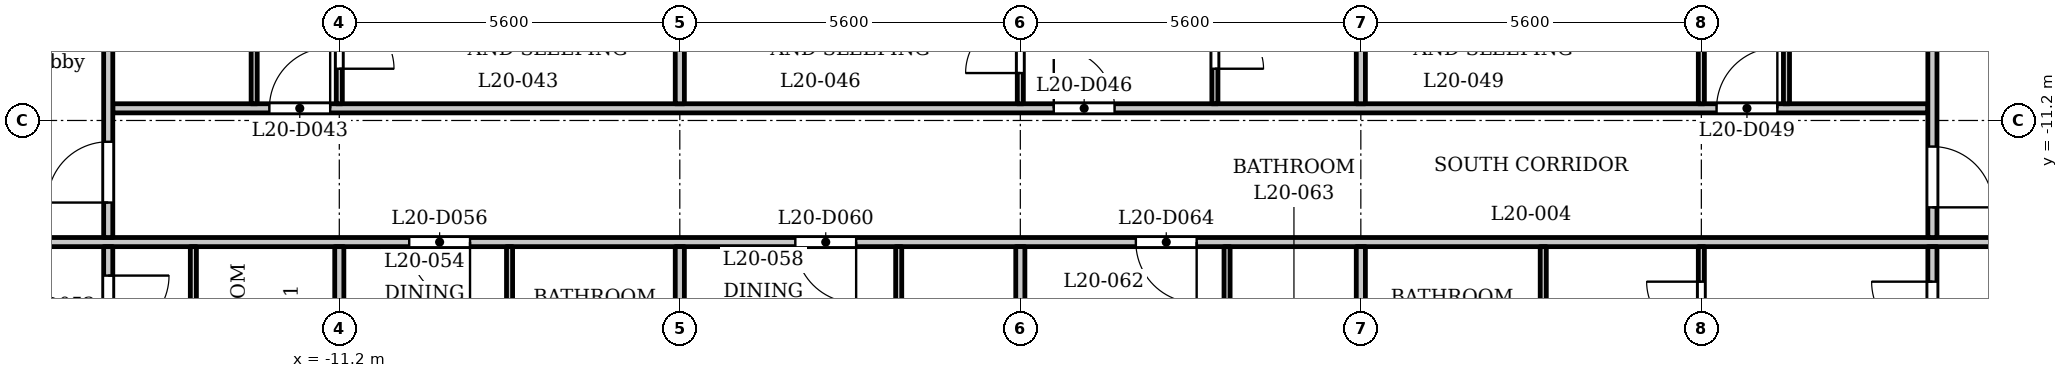
"""IFC4 building model, lengths in metres.
Left out: names, types, materials, properties, quantities, classifications, styles, units other than length and angle.
Written with IfcOpenShell. Run it as: python <this file> out.ifc"""

import sys

from ifc_helpers import new_model, si_unit, direction, frame, frame_2d, origin, place, context, subcontext, project, spatial, rectangle, extrude, element, fill, save


model = new_model("IFC4")
c1 = context("Model", 3, precision=1e-05, world=origin(), true_north=direction((0.0, 1.0)))
c2 = subcontext(c1, "Body", "Model", "MODEL_VIEW")
j1 = project(units=[si_unit("LENGTHUNIT", "METRE"), si_unit("PLANEANGLEUNIT", "RADIAN")], contexts=[c1])
p1 = place(None, origin())
s1 = spatial("IfcSite", under=j1, at=p1, CompositionType="ELEMENT")
p2 = place(p1, origin())
s2 = spatial("IfcBuilding", under=s1, at=p2, CompositionType="ELEMENT")
p3 = place(p2, frame((0.0, 0.0, 83.3)))
s3 = spatial("IfcBuildingStorey", under=s2, at=p3, CompositionType="ELEMENT", Elevation=83.3)
p4 = place(p3, frame((-17.4, -13.2, 0.0), z_axis=(0.0, 0.0, 1.0), x_axis=(1.0, 0.0, 0.0)))
e1 = element("IfcWall", 1, at=p4, inside=s3, PredefinedType="PARTITIONING", context=c2, shape_type="SweptSolid", body=[
    extrude(rectangle(XDim=34.8, YDim=0.15, at=frame_2d((17.4, 0.0))), origin(), (0.0, 0.0, 1.0), 3.2),
])
p5 = place(p4, frame((0.15, 0.0, 0.0)))
e2 = element("IfcOpeningElement", 2, at=p5, cuts=e1, PredefinedType="OPENING", context=c2, shape_type="SweptSolid", body=[
    extrude(rectangle(XDim=1.0, YDim=2.1, at=frame_2d((0.5, 1.05))), frame((0.0, 0.085, 0.0), z_axis=(0.0, -1.0, 0.0), x_axis=(1.0, 0.0, 0.0)), (0.0, 0.0, 1.0), 0.17),
])
p6 = place(p4, frame((33.55, 0.0, 0.0)))
e3 = element("IfcOpeningElement", 3, at=p6, cuts=e1, PredefinedType="OPENING", context=c2, shape_type="SweptSolid", body=[
    extrude(rectangle(XDim=1.0, YDim=2.1, at=frame_2d((0.5, 1.05))), frame((0.0, 0.085, 0.0), z_axis=(0.0, -1.0, 0.0), x_axis=(1.0, 0.0, 0.0)), (0.0, 0.0, 1.0), 0.17),
])
p7 = place(p4, frame((7.35, 0.0, 0.0)))
e4 = element("IfcOpeningElement", 4, at=p7, cuts=e1, PredefinedType="OPENING", context=c2, shape_type="SweptSolid", body=[
    extrude(rectangle(XDim=1.0, YDim=2.1, at=frame_2d((0.5, 1.05))), frame((0.0, 0.085, 0.0), z_axis=(0.0, -1.0, 0.0), x_axis=(1.0, 0.0, 0.0)), (0.0, 0.0, 1.0), 0.17),
])
p8 = place(p4, frame((13.7, 0.0, 0.0)))
e5 = element("IfcOpeningElement", 5, at=p8, cuts=e1, PredefinedType="OPENING", context=c2, shape_type="SweptSolid", body=[
    extrude(rectangle(XDim=1.0, YDim=2.1, at=frame_2d((0.5, 1.05))), frame((0.0, 0.085, 0.0), z_axis=(0.0, -1.0, 0.0), x_axis=(1.0, 0.0, 0.0)), (0.0, 0.0, 1.0), 0.17),
])
p9 = place(p4, frame((19.3, 0.0, 0.0)))
e6 = element("IfcOpeningElement", 6, at=p9, cuts=e1, PredefinedType="OPENING", context=c2, shape_type="SweptSolid", body=[
    extrude(rectangle(XDim=1.0, YDim=2.1, at=frame_2d((0.5, 1.05))), frame((0.0, 0.085, 0.0), z_axis=(0.0, -1.0, 0.0), x_axis=(1.0, 0.0, 0.0)), (0.0, 0.0, 1.0), 0.17),
])
p10 = place(p3, frame((-14.925, -11.0, 0.0), z_axis=(0.0, 0.0, 1.0), x_axis=(1.0, 0.0, 0.0)))
e7 = element("IfcWall", 7, at=p10, inside=s3, PredefinedType="PARTITIONING", context=c2, shape_type="SweptSolid", body=[
    extrude(rectangle(XDim=29.85, YDim=0.15, at=frame_2d((14.925, 0.0))), origin(), (0.0, 0.0, 1.0), 3.2),
])
p11 = place(p10, frame((2.575, 0.0, 0.0)))
e8 = element("IfcOpeningElement", 8, at=p11, cuts=e7, PredefinedType="OPENING", context=c2, shape_type="SweptSolid", body=[
    extrude(rectangle(XDim=1.0, YDim=2.1, at=frame_2d((0.5, 1.05))), frame((0.0, 0.085, 0.0), z_axis=(0.0, -1.0, 0.0), x_axis=(1.0, 0.0, 0.0)), (0.0, 0.0, 1.0), 0.17),
])
p12 = place(p10, frame((15.475, 0.0, 0.0)))
e9 = element("IfcOpeningElement", 9, at=p12, cuts=e7, PredefinedType="OPENING", context=c2, shape_type="SweptSolid", body=[
    extrude(rectangle(XDim=1.0, YDim=2.1, at=frame_2d((0.5, 1.05))), frame((0.0, 0.085, 0.0), z_axis=(0.0, -1.0, 0.0), x_axis=(1.0, 0.0, 0.0)), (0.0, 0.0, 1.0), 0.17),
])
p13 = place(p10, frame((26.375, 0.0, 0.0)))
e10 = element("IfcOpeningElement", 10, at=p13, cuts=e7, PredefinedType="OPENING", context=c2, shape_type="SweptSolid", body=[
    extrude(rectangle(XDim=1.0, YDim=2.1, at=frame_2d((0.5, 1.05))), frame((0.0, 0.085, 0.0), z_axis=(0.0, -1.0, 0.0), x_axis=(1.0, 0.0, 0.0)), (0.0, 0.0, 1.0), 0.17),
])
p14 = place(p3, frame((-15.0, -15.325, 0.0), z_axis=(0.0, 0.0, 1.0), x_axis=(0.0, 1.0, 0.0)))
e11 = element("IfcWall", 11, at=p14, inside=s3, PredefinedType="PARTITIONING", context=c2, shape_type="SweptSolid", body=[
    extrude(rectangle(XDim=2.05, YDim=0.15, at=frame_2d((1.025, 0.0))), origin(), (0.0, 0.0, 1.0), 3.2),
])
p15 = place(p14, frame((0.574, 0.0, 0.0)))
e12 = element("IfcOpeningElement", 12, at=p15, cuts=e11, PredefinedType="OPENING", context=c2, shape_type="SweptSolid", body=[
    extrude(rectangle(XDim=1.0, YDim=2.1, at=frame_2d((0.5, 1.05))), frame((0.0, 0.085, 0.0), z_axis=(0.0, -1.0, 0.0), x_axis=(1.0, 0.0, 0.0)), (0.0, 0.0, 1.0), 0.17),
])
p16 = place(p3, frame((-15.0, -13.125, 0.0), z_axis=(0.0, 0.0, 1.0), x_axis=(0.0, 1.0, 0.0)))
e13 = element("IfcWall", 13, at=p16, inside=s3, PredefinedType="PARTITIONING", context=c2, shape_type="SweptSolid", body=[
    extrude(rectangle(XDim=6.356, YDim=0.15, at=frame_2d((3.178, 0.0))), origin(), (0.0, 0.0, 1.0), 3.2),
])
p17 = place(p16, frame((0.575, 0.0, 0.0)))
e14 = element("IfcOpeningElement", 14, at=p17, cuts=e13, PredefinedType="OPENING", context=c2, shape_type="SweptSolid", body=[
    extrude(rectangle(XDim=1.0, YDim=2.1, at=frame_2d((0.5, 1.05))), frame((0.0, 0.085, 0.0), z_axis=(0.0, -1.0, 0.0), x_axis=(1.0, 0.0, 0.0)), (0.0, 0.0, 1.0), 0.17),
])
p18 = place(p3, frame((-13.6, -16.45, 0.0), z_axis=(0.0, 0.0, 1.0), x_axis=(0.0, 1.0, 0.0)))
e15 = element("IfcWall", 15, at=p18, inside=s3, PredefinedType="PARTITIONING", context=c2, shape_type="SweptSolid", body=[
    extrude(rectangle(XDim=3.175, YDim=0.1, at=frame_2d((1.587, 0.0))), origin(), (0.0, 0.0, 1.0), 3.2),
])
p19 = place(p3, frame((-12.6, -10.925, 0.0), z_axis=(0.0, 0.0, 1.0), x_axis=(0.0, 1.0, 0.0)))
e16 = element("IfcWall", 16, at=p19, inside=s3, PredefinedType="PARTITIONING", context=c2, shape_type="SweptSolid", body=[
    extrude(rectangle(XDim=3.605, YDim=0.1, at=frame_2d((1.802, 0.0))), origin(), (0.0, 0.0, 1.0), 3.2),
])
p20 = place(p19, frame((1.105, 0.0, 0.0)))
e17 = element("IfcOpeningElement", 17, at=p20, cuts=e16, PredefinedType="OPENING", context=c2, shape_type="SweptSolid", body=[
    extrude(rectangle(XDim=0.8, YDim=2.1, at=frame_2d((0.4, 1.05))), frame((0.0, 0.06, 0.0), z_axis=(0.0, -1.0, 0.0), x_axis=(1.0, 0.0, 0.0)), (0.0, 0.0, 1.0), 0.12),
])
p21 = place(p3, frame((-11.2, -10.925, 0.0), z_axis=(0.0, 0.0, 1.0), x_axis=(0.0, 1.0, 0.0)))
e18 = element("IfcWall", 18, at=p21, inside=s3, PredefinedType="PARTITIONING", context=c2, shape_type="SweptSolid", body=[
    extrude(rectangle(XDim=3.605, YDim=0.1, at=frame_2d((1.802, 0.0))), origin(), (0.0, 0.0, 1.0), 3.2),
])
p22 = place(p21, frame((0.576, 0.0, 0.0)))
e19 = element("IfcOpeningElement", 19, at=p22, cuts=e18, PredefinedType="OPENING", context=c2, shape_type="SweptSolid", body=[
    extrude(rectangle(XDim=0.9, YDim=2.1, at=frame_2d((0.45, 1.05))), frame((0.0, 0.06, 0.0), z_axis=(0.0, -1.0, 0.0), x_axis=(1.0, 0.0, 0.0)), (0.0, 0.0, 1.0), 0.12),
])
p23 = place(p3, frame((-11.2, -16.45, 0.0), z_axis=(0.0, 0.0, 1.0), x_axis=(0.0, 1.0, 0.0)))
e20 = element("IfcWall", 20, at=p23, inside=s3, PredefinedType="PARTITIONING", context=c2, shape_type="SweptSolid", body=[
    extrude(rectangle(XDim=3.175, YDim=0.15, at=frame_2d((1.587, 0.0))), origin(), (0.0, 0.0, 1.0), 3.2),
])
p24 = place(p3, frame((-8.4, -16.45, 0.0), z_axis=(0.0, 0.0, 1.0), x_axis=(0.0, 1.0, 0.0)))
e21 = element("IfcWall", 21, at=p24, inside=s3, PredefinedType="PARTITIONING", context=c2, shape_type="SweptSolid", body=[
    extrude(rectangle(XDim=3.175, YDim=0.1, at=frame_2d((1.587, 0.0))), origin(), (0.0, 0.0, 1.0), 3.2),
])
p25 = place(p3, frame((-5.6, -16.45, 0.0), z_axis=(0.0, 0.0, 1.0), x_axis=(0.0, 1.0, 0.0)))
e22 = element("IfcWall", 22, at=p25, inside=s3, PredefinedType="PARTITIONING", context=c2, shape_type="SweptSolid", body=[
    extrude(rectangle(XDim=3.175, YDim=0.15, at=frame_2d((1.587, 0.0))), origin(), (0.0, 0.0, 1.0), 3.2),
])
p26 = place(p3, frame((-5.6, -10.925, 0.0), z_axis=(0.0, 0.0, 1.0), x_axis=(0.0, 1.0, 0.0)))
e23 = element("IfcWall", 23, at=p26, inside=s3, PredefinedType="PARTITIONING", context=c2, shape_type="SweptSolid", body=[
    extrude(rectangle(XDim=3.605, YDim=0.15, at=frame_2d((1.802, 0.0))), origin(), (0.0, 0.0, 1.0), 3.2),
])
p27 = place(p3, frame((-2.0, -16.45, 0.0), z_axis=(0.0, 0.0, 1.0), x_axis=(0.0, 1.0, 0.0)))
e24 = element("IfcWall", 24, at=p27, inside=s3, PredefinedType="PARTITIONING", context=c2, shape_type="SweptSolid", body=[
    extrude(rectangle(XDim=3.175, YDim=0.1, at=frame_2d((1.587, 0.0))), origin(), (0.0, 0.0, 1.0), 3.2),
])
p28 = place(p3, frame((0.0, -10.925, 0.0), z_axis=(0.0, 0.0, 1.0), x_axis=(0.0, 1.0, 0.0)))
e25 = element("IfcWall", 25, at=p28, inside=s3, PredefinedType="PARTITIONING", context=c2, shape_type="SweptSolid", body=[
    extrude(rectangle(XDim=3.605, YDim=0.1, at=frame_2d((1.802, 0.0))), origin(), (0.0, 0.0, 1.0), 3.2),
])
p29 = place(p28, frame((0.505, 0.0, 0.0)))
e26 = element("IfcOpeningElement", 26, at=p29, cuts=e25, PredefinedType="OPENING", context=c2, shape_type="SweptSolid", body=[
    extrude(rectangle(XDim=0.9, YDim=2.1, at=frame_2d((0.45, 1.05))), frame((0.0, 0.06, 0.0), z_axis=(0.0, -1.0, 0.0), x_axis=(1.0, 0.0, 0.0)), (0.0, 0.0, 1.0), 0.12),
])
p30 = place(p3, frame((0.0, -16.45, 0.0), z_axis=(0.0, 0.0, 1.0), x_axis=(0.0, 1.0, 0.0)))
e27 = element("IfcWall", 27, at=p30, inside=s3, PredefinedType="PARTITIONING", context=c2, shape_type="SweptSolid", body=[
    extrude(rectangle(XDim=3.175, YDim=0.15, at=frame_2d((1.587, 0.0))), origin(), (0.0, 0.0, 1.0), 3.2),
])
p31 = place(p3, frame((3.2, -10.925, 0.0), z_axis=(0.0, 0.0, 1.0), x_axis=(0.0, 1.0, 0.0)))
e28 = element("IfcWall", 28, at=p31, inside=s3, PredefinedType="PARTITIONING", context=c2, shape_type="SweptSolid", body=[
    extrude(rectangle(XDim=3.605, YDim=0.1, at=frame_2d((1.802, 0.0))), origin(), (0.0, 0.0, 1.0), 3.2),
])
p32 = place(p31, frame((0.576, 0.0, 0.0)))
e29 = element("IfcOpeningElement", 29, at=p32, cuts=e28, PredefinedType="OPENING", context=c2, shape_type="SweptSolid", body=[
    extrude(rectangle(XDim=0.8, YDim=2.1, at=frame_2d((0.4, 1.05))), frame((0.0, 0.06, 0.0), z_axis=(0.0, -1.0, 0.0), x_axis=(1.0, 0.0, 0.0)), (0.0, 0.0, 1.0), 0.12),
])
p33 = place(p3, frame((3.4, -16.45, 0.0), z_axis=(0.0, 0.0, 1.0), x_axis=(0.0, 1.0, 0.0)))
e30 = element("IfcWall", 30, at=p33, inside=s3, PredefinedType="PARTITIONING", context=c2, shape_type="SweptSolid", body=[
    extrude(rectangle(XDim=3.175, YDim=0.1, at=frame_2d((1.587, 0.0))), origin(), (0.0, 0.0, 1.0), 3.2),
])
p34 = place(p3, frame((5.6, -16.45, 0.0), z_axis=(0.0, 0.0, 1.0), x_axis=(0.0, 1.0, 0.0)))
e31 = element("IfcWall", 31, at=p34, inside=s3, PredefinedType="PARTITIONING", context=c2, shape_type="SweptSolid", body=[
    extrude(rectangle(XDim=3.175, YDim=0.15, at=frame_2d((1.587, 0.0))), origin(), (0.0, 0.0, 1.0), 3.2),
])
p35 = place(p3, frame((5.6, -10.925, 0.0), z_axis=(0.0, 0.0, 1.0), x_axis=(0.0, 1.0, 0.0)))
e32 = element("IfcWall", 32, at=p35, inside=s3, PredefinedType="PARTITIONING", context=c2, shape_type="SweptSolid", body=[
    extrude(rectangle(XDim=3.605, YDim=0.15, at=frame_2d((1.802, 0.0))), origin(), (0.0, 0.0, 1.0), 3.2),
])
p36 = place(p3, frame((8.6, -16.45, 0.0), z_axis=(0.0, 0.0, 1.0), x_axis=(0.0, 1.0, 0.0)))
e33 = element("IfcWall", 33, at=p36, inside=s3, PredefinedType="PARTITIONING", context=c2, shape_type="SweptSolid", body=[
    extrude(rectangle(XDim=3.175, YDim=0.1, at=frame_2d((1.587, 0.0))), origin(), (0.0, 0.0, 1.0), 3.2),
])
p37 = place(p3, frame((11.2, -16.45, 0.0), z_axis=(0.0, 0.0, 1.0), x_axis=(0.0, 1.0, 0.0)))
e34 = element("IfcWall", 34, at=p37, inside=s3, PredefinedType="PARTITIONING", context=c2, shape_type="SweptSolid", body=[
    extrude(rectangle(XDim=3.175, YDim=0.1, at=frame_2d((1.587, 0.0))), origin(), (0.0, 0.0, 1.0), 3.2),
])
p38 = place(p37, frame((1.699, 0.0, 0.0)))
e35 = element("IfcOpeningElement", 35, at=p38, cuts=e34, PredefinedType="OPENING", context=c2, shape_type="SweptSolid", body=[
    extrude(rectangle(XDim=0.9, YDim=2.1, at=frame_2d((0.45, 1.05))), frame((0.0, 0.06, 0.0), z_axis=(0.0, -1.0, 0.0), x_axis=(1.0, 0.0, 0.0)), (0.0, 0.0, 1.0), 0.12),
])
p39 = place(p3, frame((11.2, -10.925, 0.0), z_axis=(0.0, 0.0, 1.0), x_axis=(0.0, 1.0, 0.0)))
e36 = element("IfcWall", 36, at=p39, inside=s3, PredefinedType="PARTITIONING", context=c2, shape_type="SweptSolid", body=[
    extrude(rectangle(XDim=3.605, YDim=0.1, at=frame_2d((1.802, 0.0))), origin(), (0.0, 0.0, 1.0), 3.2),
])
p40 = place(p39, frame((1.005, 0.0, 0.0)))
e37 = element("IfcOpeningElement", 37, at=p40, cuts=e36, PredefinedType="OPENING", context=c2, shape_type="SweptSolid", body=[
    extrude(rectangle(XDim=0.9, YDim=2.1, at=frame_2d((0.45, 1.05))), frame((0.0, 0.06, 0.0), z_axis=(0.0, -1.0, 0.0), x_axis=(1.0, 0.0, 0.0)), (0.0, 0.0, 1.0), 0.12),
])
p41 = place(p3, frame((12.6, -10.925, 0.0), z_axis=(0.0, 0.0, 1.0), x_axis=(0.0, 1.0, 0.0)))
e38 = element("IfcWall", 38, at=p41, inside=s3, PredefinedType="PARTITIONING", context=c2, shape_type="SweptSolid", body=[
    extrude(rectangle(XDim=3.605, YDim=0.1, at=frame_2d((1.802, 0.0))), origin(), (0.0, 0.0, 1.0), 3.2),
])
p42 = place(p41, frame((1.076, 0.0, 0.0)))
e39 = element("IfcOpeningElement", 39, at=p42, cuts=e38, PredefinedType="OPENING", context=c2, shape_type="SweptSolid", body=[
    extrude(rectangle(XDim=0.8, YDim=2.1, at=frame_2d((0.4, 1.05))), frame((0.0, 0.06, 0.0), z_axis=(0.0, -1.0, 0.0), x_axis=(1.0, 0.0, 0.0)), (0.0, 0.0, 1.0), 0.12),
])
p43 = place(p3, frame((15.0, -15.325, 0.0), z_axis=(0.0, 0.0, 1.0), x_axis=(0.0, 1.0, 0.0)))
e40 = element("IfcWall", 40, at=p43, inside=s3, PredefinedType="PARTITIONING", context=c2, shape_type="SweptSolid", body=[
    extrude(rectangle(XDim=2.05, YDim=0.15, at=frame_2d((1.025, 0.0))), origin(), (0.0, 0.0, 1.0), 3.2),
])
p44 = place(p43, frame((0.474, 0.0, 0.0)))
e41 = element("IfcOpeningElement", 41, at=p44, cuts=e40, PredefinedType="OPENING", context=c2, shape_type="SweptSolid", body=[
    extrude(rectangle(XDim=1.0, YDim=2.1, at=frame_2d((0.5, 1.05))), frame((0.0, 0.085, 0.0), z_axis=(0.0, -1.0, 0.0), x_axis=(1.0, 0.0, 0.0)), (0.0, 0.0, 1.0), 0.17),
])
p45 = place(p3, frame((15.0, -13.125, 0.0), z_axis=(0.0, 0.0, 1.0), x_axis=(0.0, 1.0, 0.0)))
e42 = element("IfcWall", 42, at=p45, inside=s3, PredefinedType="PARTITIONING", context=c2, shape_type="SweptSolid", body=[
    extrude(rectangle(XDim=6.356, YDim=0.15, at=frame_2d((3.178, 0.0))), origin(), (0.0, 0.0, 1.0), 3.2),
])
p46 = place(p45, frame((0.496, 0.0, 0.0)))
e43 = element("IfcOpeningElement", 43, at=p46, cuts=e42, PredefinedType="OPENING", context=c2, shape_type="SweptSolid", body=[
    extrude(rectangle(XDim=1.0, YDim=2.1, at=frame_2d((0.5, 1.05))), frame((0.0, 0.085, 0.0), z_axis=(0.0, -1.0, 0.0), x_axis=(1.0, 0.0, 0.0)), (0.0, 0.0, 1.0), 0.17),
])
p47 = place(p17, origin())
e44 = element("IfcDoor", 44, at=p47, inside=s3, OperationType="SINGLE_SWING_RIGHT", PredefinedType="DOOR", context=c2, shape_type="SweptSolid", body=[
    extrude(rectangle(XDim=1.0, YDim=2.1, at=frame_2d((0.5, 1.05))), frame((0.0, 0.025, 0.0), z_axis=(0.0, -1.0, 0.0), x_axis=(1.0, 0.0, 0.0)), (0.0, 0.0, 1.0), 0.05),
])
fill(e14, e44)
p48 = place(p46, origin())
e45 = element("IfcDoor", 45, at=p48, inside=s3, OperationType="SINGLE_SWING_LEFT", PredefinedType="DOOR", context=c2, shape_type="SweptSolid", body=[
    extrude(rectangle(XDim=1.0, YDim=2.1, at=frame_2d((0.5, 1.05))), frame((0.0, 0.025, 0.0), z_axis=(0.0, -1.0, 0.0), x_axis=(1.0, 0.0, 0.0)), (0.0, 0.0, 1.0), 0.05),
])
fill(e43, e45)
p49 = place(p11, origin())
e46 = element("IfcDoor", 46, at=p49, inside=s3, OperationType="SINGLE_SWING_LEFT", PredefinedType="DOOR", context=c2, shape_type="SweptSolid", body=[
    extrude(rectangle(XDim=1.0, YDim=2.1, at=frame_2d((0.5, 1.05))), frame((0.0, 0.025, 0.0), z_axis=(0.0, -1.0, 0.0), x_axis=(1.0, 0.0, 0.0)), (0.0, 0.0, 1.0), 0.05),
])
fill(e8, e46)
p50 = place(p22, origin())
e47 = element("IfcDoor", 47, at=p50, inside=s3, OperationType="SINGLE_SWING_LEFT", PredefinedType="DOOR", context=c2, shape_type="SweptSolid", body=[
    extrude(rectangle(XDim=0.9, YDim=2.1, at=frame_2d((0.45, 1.05))), frame((0.0, 0.025, 0.0), z_axis=(0.0, -1.0, 0.0), x_axis=(1.0, 0.0, 0.0)), (0.0, 0.0, 1.0), 0.05),
])
fill(e19, e47)
p51 = place(p12, origin())
e48 = element("IfcDoor", 48, at=p51, inside=s3, OperationType="SINGLE_SWING_RIGHT", PredefinedType="DOOR", context=c2, shape_type="SweptSolid", body=[
    extrude(rectangle(XDim=1.0, YDim=2.1, at=frame_2d((0.5, 1.05))), frame((0.0, 0.025, 0.0), z_axis=(0.0, -1.0, 0.0), x_axis=(1.0, 0.0, 0.0)), (0.0, 0.0, 1.0), 0.05),
])
fill(e9, e48)
p52 = place(p32, origin())
e49 = element("IfcDoor", 49, at=p52, inside=s3, OperationType="SINGLE_SWING_LEFT", PredefinedType="DOOR", context=c2, shape_type="SweptSolid", body=[
    extrude(rectangle(XDim=0.8, YDim=2.1, at=frame_2d((0.4, 1.05))), frame((0.0, 0.025, 0.0), z_axis=(0.0, -1.0, 0.0), x_axis=(1.0, 0.0, 0.0)), (0.0, 0.0, 1.0), 0.05),
])
fill(e29, e49)
p53 = place(p29, origin())
e50 = element("IfcDoor", 50, at=p53, inside=s3, OperationType="SINGLE_SWING_RIGHT", PredefinedType="DOOR", context=c2, shape_type="SweptSolid", body=[
    extrude(rectangle(XDim=0.9, YDim=2.1, at=frame_2d((0.45, 1.05))), frame((0.0, 0.025, 0.0), z_axis=(0.0, -1.0, 0.0), x_axis=(1.0, 0.0, 0.0)), (0.0, 0.0, 1.0), 0.05),
])
fill(e26, e50)
p54 = place(p13, origin())
e51 = element("IfcDoor", 51, at=p54, inside=s3, OperationType="SINGLE_SWING_LEFT", PredefinedType="DOOR", context=c2, shape_type="SweptSolid", body=[
    extrude(rectangle(XDim=1.0, YDim=2.1, at=frame_2d((0.5, 1.05))), frame((0.0, 0.025, 0.0), z_axis=(0.0, -1.0, 0.0), x_axis=(1.0, 0.0, 0.0)), (0.0, 0.0, 1.0), 0.05),
])
fill(e10, e51)
p55 = place(p15, origin())
e52 = element("IfcDoor", 52, at=p55, inside=s3, OperationType="SINGLE_SWING_RIGHT", PredefinedType="DOOR", context=c2, shape_type="SweptSolid", body=[
    extrude(rectangle(XDim=1.0, YDim=2.1, at=frame_2d((0.5, 1.05))), frame((0.0, 0.025, 0.0), z_axis=(0.0, -1.0, 0.0), x_axis=(1.0, 0.0, 0.0)), (0.0, 0.0, 1.0), 0.05),
])
fill(e12, e52)
p56 = place(p7, origin())
e53 = element("IfcDoor", 53, at=p56, inside=s3, OperationType="SINGLE_SWING_RIGHT", PredefinedType="DOOR", context=c2, shape_type="SweptSolid", body=[
    extrude(rectangle(XDim=1.0, YDim=2.1, at=frame_2d((0.5, 1.05))), frame((0.0, 0.025, 0.0), z_axis=(0.0, -1.0, 0.0), x_axis=(1.0, 0.0, 0.0)), (0.0, 0.0, 1.0), 0.05),
])
fill(e4, e53)
p57 = place(p8, origin())
e54 = element("IfcDoor", 54, at=p57, inside=s3, OperationType="SINGLE_SWING_RIGHT", PredefinedType="DOOR", context=c2, shape_type="SweptSolid", body=[
    extrude(rectangle(XDim=1.0, YDim=2.1, at=frame_2d((0.5, 1.05))), frame((0.0, 0.025, 0.0), z_axis=(0.0, -1.0, 0.0), x_axis=(1.0, 0.0, 0.0)), (0.0, 0.0, 1.0), 0.05),
])
fill(e5, e54)
p58 = place(p9, origin())
e55 = element("IfcDoor", 55, at=p58, inside=s3, OperationType="SINGLE_SWING_RIGHT", PredefinedType="DOOR", context=c2, shape_type="SweptSolid", body=[
    extrude(rectangle(XDim=1.0, YDim=2.1, at=frame_2d((0.5, 1.05))), frame((0.0, 0.025, 0.0), z_axis=(0.0, -1.0, 0.0), x_axis=(1.0, 0.0, 0.0)), (0.0, 0.0, 1.0), 0.05),
])
fill(e6, e55)
p59 = place(p44, origin())
e56 = element("IfcDoor", 56, at=p59, inside=s3, OperationType="SINGLE_SWING_LEFT", PredefinedType="DOOR", context=c2, shape_type="SweptSolid", body=[
    extrude(rectangle(XDim=1.0, YDim=2.1, at=frame_2d((0.5, 1.05))), frame((0.0, 0.025, 0.0), z_axis=(0.0, -1.0, 0.0), x_axis=(1.0, 0.0, 0.0)), (0.0, 0.0, 1.0), 0.05),
])
fill(e41, e56)
p60 = place(p38, origin())
e57 = element("IfcDoor", 57, at=p60, inside=s3, OperationType="SINGLE_SWING_LEFT", PredefinedType="DOOR", context=c2, shape_type="SweptSolid", body=[
    extrude(rectangle(XDim=0.9, YDim=2.1, at=frame_2d((0.45, 1.05))), frame((0.0, 0.025, 0.0), z_axis=(0.0, -1.0, 0.0), x_axis=(1.0, 0.0, 0.0)), (0.0, 0.0, 1.0), 0.05),
])
fill(e35, e57)
save(model, sys.argv[1])
